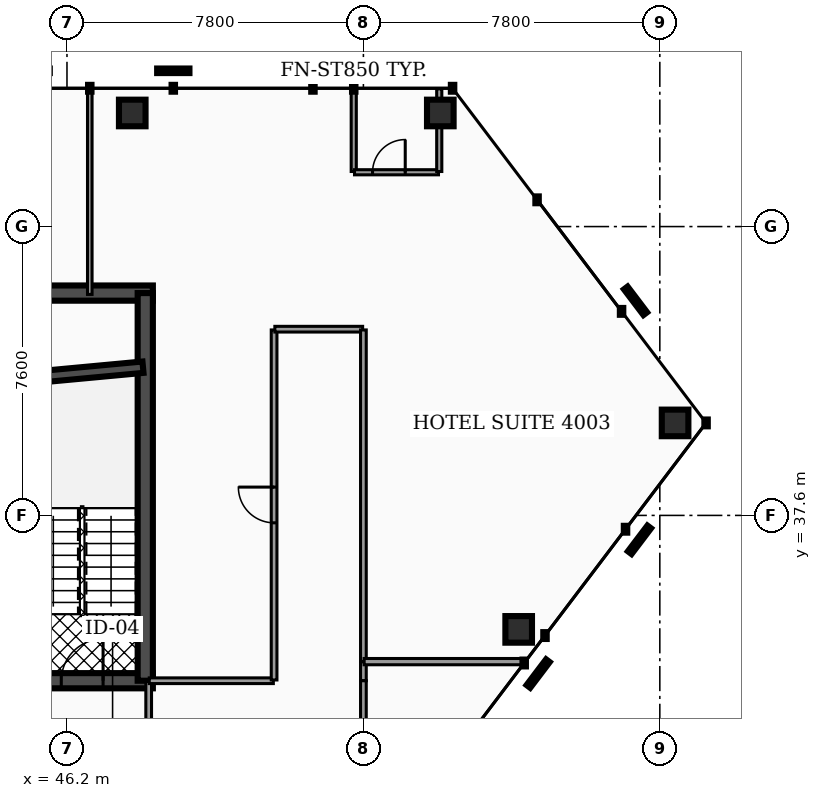
"""IFC4 building model, lengths in metres.
Left out: names, types, materials, properties, quantities, classifications, styles, units other than length and angle.
Written with IfcOpenShell. Run it as: python <this file> out.ifc"""

import sys

from ifc_helpers import new_model, si_unit, direction, frame, frame_2d, origin, origin_2d, place, context, subcontext, project, spatial, rectangle, hollow_rectangle, extrude, element, fill, save


model = new_model("IFC4")
c1 = context("Model", 3, precision=1e-05, world=origin(), true_north=direction((0.0, 1.0)))
c2 = subcontext(c1, "Body", "Model", "MODEL_VIEW")
j1 = project(units=[si_unit("LENGTHUNIT", "METRE"), si_unit("PLANEANGLEUNIT", "RADIAN")], contexts=[c1])
p1 = place(None, origin())
s1 = spatial("IfcSite", under=j1, at=p1, CompositionType="ELEMENT")
p2 = place(p1, origin())
s2 = spatial("IfcBuilding", under=s1, at=p2, CompositionType="ELEMENT")
p3 = place(p2, frame((0.0, 0.0, 164.56)))
s3 = spatial("IfcBuildingStorey", under=s2, at=p3, CompositionType="ELEMENT", Elevation=164.56)
p4 = place(p3, frame((28.4, 43.45, 0.0), z_axis=(0.0, 0.0, 1.0), x_axis=(1.0, 0.0, 0.0)))
e1 = element("IfcWall", 1, at=p4, inside=s3, PredefinedType="SHEAR", context=c2, shape_type="SweptSolid", body=[
    extrude(rectangle(XDim=20.06, YDim=0.4, at=frame_2d((10.03, 0.0))), origin(), (0.0, 0.0, 1.0), 3.5),
])
p5 = place(p3, frame((28.4, 33.25, 0.0), z_axis=(0.0, 0.0, 1.0), x_axis=(1.0, 0.0, 0.0)))
e2 = element("IfcWall", 2, at=p5, inside=s3, PredefinedType="SHEAR", context=c2, shape_type="SweptSolid", body=[
    extrude(rectangle(XDim=20.06, YDim=0.4, at=frame_2d((10.03, 0.0))), origin(), (0.0, 0.0, 1.0), 3.5),
])
p6 = place(p5, frame((4.03, 0.0, 0.0)))
e3 = element("IfcOpeningElement", 3, at=p6, cuts=e2, PredefinedType="OPENING", context=c2, shape_type="SweptSolid", body=[
    extrude(rectangle(XDim=1.1, YDim=2.15, at=frame_2d((0.55, 1.075))), frame((0.0, 0.21, 0.0), z_axis=(0.0, -1.0, 0.0), x_axis=(1.0, 0.0, 0.0)), (0.0, 0.0, 1.0), 0.42),
])
p7 = place(p5, frame((14.87, 0.0, 0.0)))
e4 = element("IfcOpeningElement", 4, at=p7, cuts=e2, PredefinedType="OPENING", context=c2, shape_type="SweptSolid", body=[
    extrude(rectangle(XDim=1.1, YDim=2.15, at=frame_2d((0.55, 1.075))), frame((0.0, 0.21, 0.0), z_axis=(0.0, -1.0, 0.0), x_axis=(1.0, 0.0, 0.0)), (0.0, 0.0, 1.0), 0.42),
])
p8 = place(p5, frame((5.95, 0.0, 0.0)))
e5 = element("IfcOpeningElement", 5, at=p8, cuts=e2, PredefinedType="OPENING", context=c2, shape_type="SweptSolid", body=[
    extrude(rectangle(XDim=1.0, YDim=2.1, at=frame_2d((0.5, 1.05))), frame((0.0, 0.21, 0.0), z_axis=(0.0, -1.0, 0.0), x_axis=(1.0, 0.0, 0.0)), (0.0, 0.0, 1.0), 0.42),
])
p9 = place(p5, frame((7.65, 0.0, 0.0)))
e6 = element("IfcOpeningElement", 6, at=p9, cuts=e2, PredefinedType="OPENING", context=c2, shape_type="SweptSolid", body=[
    extrude(rectangle(XDim=1.0, YDim=2.1, at=frame_2d((0.5, 1.05))), frame((0.0, 0.21, 0.0), z_axis=(0.0, -1.0, 0.0), x_axis=(1.0, 0.0, 0.0)), (0.0, 0.0, 1.0), 0.42),
])
p10 = place(p5, frame((1.31, 0.0, 0.0)))
e7 = element("IfcOpeningElement", 7, at=p10, cuts=e2, PredefinedType="OPENING", context=c2, shape_type="SweptSolid", body=[
    extrude(rectangle(XDim=1.1, YDim=2.2, at=frame_2d((0.55, 1.1))), frame((0.0, 0.21, 0.0), z_axis=(0.0, -1.0, 0.0), x_axis=(1.0, 0.0, 0.0)), (0.0, 0.0, 1.0), 0.42),
])
p11 = place(p5, frame((9.44, 0.0, 0.0)))
e8 = element("IfcOpeningElement", 8, at=p11, cuts=e2, PredefinedType="OPENING", context=c2, shape_type="SweptSolid", body=[
    extrude(rectangle(XDim=1.12, YDim=2.05, at=frame_2d((0.56, 1.025))), frame((0.0, 0.21, 0.0), z_axis=(0.0, -1.0, 0.0), x_axis=(1.0, 0.0, 0.0)), (0.0, 0.0, 1.0), 0.42),
])
p12 = place(p5, frame((17.65, 0.0, 0.0)))
e9 = element("IfcOpeningElement", 9, at=p12, cuts=e2, PredefinedType="OPENING", context=c2, shape_type="SweptSolid", body=[
    extrude(rectangle(XDim=1.1, YDim=2.2, at=frame_2d((0.55, 1.1))), frame((0.0, 0.21, 0.0), z_axis=(0.0, -1.0, 0.0), x_axis=(1.0, 0.0, 0.0)), (0.0, 0.0, 1.0), 0.42),
])
p13 = place(p3, frame((48.26, 33.25, 0.0), z_axis=(0.0, 0.0, 1.0), x_axis=(0.0, 1.0, 0.0)))
e10 = element("IfcWall", 10, at=p13, inside=s3, PredefinedType="SHEAR", context=c2, shape_type="SweptSolid", body=[
    extrude(rectangle(XDim=10.2, YDim=0.4, at=frame_2d((5.1, 0.0))), origin(), (0.0, 0.0, 1.0), 3.5),
])
p14 = place(p3, frame((44.98, 41.2, 0.0), z_axis=(0.0, 0.0, 1.0), x_axis=(0.995686468965, 0.09278176286, 0.0)))
e11 = element("IfcWall", 11, at=p14, inside=s3, PredefinedType="SHEAR", context=c2, shape_type="SweptSolid", body=[
    extrude(rectangle(XDim=3.234, YDim=0.3, at=frame_2d((1.617, 0.0))), origin(), (0.0, 0.0, 1.0), 3.5),
])
for number, where, z_axis, x_axis in (
    (12, (56.024, 48.189, 0.0), (0.0, 0.0, 1.0), (1.0, 0.0, 0.0)),
    (13, (47.917, 48.189, 0.0), (0.0, 0.0, 1.0), (1.0, 0.0, 0.0)),
    (14, (58.086, 34.601, 0.0), (0.0, 0.0, 1.0), (1.0, 0.0, 0.0)),
    (15, (62.202, 40.034, 0.0), (0.0, 0.0, 1.0), (1.0, 0.0, 0.0)),
):
    element("IfcColumn", number, at=place(p3, frame(where, z_axis=z_axis, x_axis=x_axis)), inside=s3, PredefinedType="COLUMN", context=c2, shape_type="SweptSolid", body=[
        extrude(hollow_rectangle(XDim=0.7, YDim=0.7, WallThickness=0.035, at=origin_2d()), origin(), (0.0, 0.0, 1.0), 3.5),
    ])
p15 = place(p3, frame((48.35, 30.17, 0.0), z_axis=(0.0, 0.0, 1.0), x_axis=(0.0, 1.0, 0.0)))
e16 = element("IfcWall", 16, at=p15, inside=s3, PredefinedType="PARTITIONING", context=c2, shape_type="SweptSolid", body=[
    extrude(rectangle(XDim=3.06, YDim=0.15, at=frame_2d((1.53, 0.0))), origin(), (0.0, 0.0, 1.0), 2.457),
])
p16 = place(p15, frame((1.06, 0.0, 0.0)))
e17 = element("IfcOpeningElement", 17, at=p16, cuts=e16, PredefinedType="OPENING", context=c2, shape_type="SweptSolid", body=[
    extrude(rectangle(XDim=0.94, YDim=2.05, at=frame_2d((0.47, 1.025))), frame((0.0, 0.085, 0.0), z_axis=(0.0, -1.0, 0.0), x_axis=(1.0, 0.0, 0.0)), (0.0, 0.0, 1.0), 0.17),
])
p17 = place(p3, frame((54.0, 33.25, 0.0), z_axis=(0.0, 0.0, 1.0), x_axis=(0.0, 1.0, 0.0)))
e18 = element("IfcWall", 18, at=p17, inside=s3, PredefinedType="PARTITIONING", context=c2, shape_type="SweptSolid", body=[
    extrude(rectangle(XDim=0.498, YDim=0.15, at=frame_2d((0.249, 0.0))), origin(), (0.0, 0.0, 1.0), 2.457),
])
p18 = place(p3, frame((54.0, 31.894, 0.0), z_axis=(0.0, 0.0, 1.0), x_axis=(0.0, 1.0, 0.0)))
e19 = element("IfcWall", 19, at=p18, inside=s3, PredefinedType="PARTITIONING", context=c2, shape_type="SweptSolid", body=[
    extrude(rectangle(XDim=1.356, YDim=0.15, at=frame_2d((0.678, 0.0))), origin(), (0.0, 0.0, 1.0), 2.457),
])
p19 = place(p3, frame((48.365, 33.25, 0.0), z_axis=(0.0, 0.0, 1.0), x_axis=(1.0, 0.0, 0.0)))
e20 = element("IfcWall", 20, at=p19, inside=s3, PredefinedType="PARTITIONING", context=c2, shape_type="SweptSolid", body=[
    extrude(rectangle(XDim=3.265, YDim=0.15, at=frame_2d((1.632, 0.0))), origin(), (0.0, 0.0, 1.0), 2.457),
])
p20 = place(p3, frame((51.65, 33.27, 0.0), z_axis=(0.0, 0.0, 1.0), x_axis=(0.0, 1.0, 0.0)))
e21 = element("IfcWall", 21, at=p20, inside=s3, PredefinedType="PARTITIONING", context=c2, shape_type="SweptSolid", body=[
    extrude(rectangle(XDim=9.21, YDim=0.15, at=frame_2d((4.605, 0.0))), origin(), (0.0, 0.0, 1.0), 2.457),
])
p21 = place(p20, frame((4.135, 0.0, 0.0)))
e22 = element("IfcOpeningElement", 22, at=p21, cuts=e21, PredefinedType="OPENING", context=c2, shape_type="SweptSolid", body=[
    extrude(rectangle(XDim=0.94, YDim=2.05, at=frame_2d((0.47, 1.025))), frame((0.0, 0.085, 0.0), z_axis=(0.0, -1.0, 0.0), x_axis=(1.0, 0.0, 0.0)), (0.0, 0.0, 1.0), 0.17),
])
p22 = place(p3, frame((51.67, 42.5, 0.0), z_axis=(0.0, 0.0, 1.0), x_axis=(1.0, 0.0, 0.0)))
e23 = element("IfcWall", 23, at=p22, inside=s3, PredefinedType="PARTITIONING", context=c2, shape_type="SweptSolid", body=[
    extrude(rectangle(XDim=2.31, YDim=0.15, at=frame_2d((1.155, 0.0))), origin(), (0.0, 0.0, 1.0), 2.457),
])
p23 = place(p3, frame((54.0, 33.758, 0.0), z_axis=(0.0, 0.0, 1.0), x_axis=(0.0, 1.0, 0.0)))
e24 = element("IfcWall", 24, at=p23, inside=s3, PredefinedType="PARTITIONING", context=c2, shape_type="SweptSolid", body=[
    extrude(rectangle(XDim=8.722, YDim=0.15, at=frame_2d((4.361, 0.0))), origin(), (0.0, 0.0, 1.0), 2.457),
])
p24 = place(p3, frame((46.8, 43.415, 0.0), z_axis=(0.0, 0.0, 1.0), x_axis=(0.0, 1.0, 0.0)))
e25 = element("IfcWall", 25, at=p24, inside=s3, PredefinedType="PARTITIONING", context=c2, shape_type="SweptSolid", body=[
    extrude(rectangle(XDim=5.409, YDim=0.12, at=frame_2d((2.705, 0.0))), origin(), (0.0, 0.0, 1.0), 2.457),
])
p25 = place(p3, frame((54.02, 33.753, 0.0), z_axis=(0.0, 0.0, 1.0), x_axis=(1.0, 0.0, 0.0)))
e26 = element("IfcWall", 26, at=p25, inside=s3, PredefinedType="PARTITIONING", context=c2, shape_type="SweptSolid", body=[
    extrude(rectangle(XDim=4.224, YDim=0.165, at=frame_2d((2.112, 0.0))), origin(), (0.0, 0.0, 1.0), 2.457),
])
p26 = place(p3, frame((53.746, 46.649, 0.0), z_axis=(0.0, 0.0, 1.0), x_axis=(0.0, 1.0, 0.0)))
e27 = element("IfcWall", 27, at=p26, inside=s3, PredefinedType="PARTITIONING", context=c2, shape_type="SweptSolid", body=[
    extrude(rectangle(XDim=2.175, YDim=0.135, at=frame_2d((1.087, 0.0))), origin(), (0.0, 0.0, 1.0), 2.457),
])
p27 = place(p3, frame((53.766, 46.629, 0.0), z_axis=(0.0, 0.0, 1.0), x_axis=(1.0, 0.0, 0.0)))
e28 = element("IfcWall", 28, at=p27, inside=s3, PredefinedType="PARTITIONING", context=c2, shape_type="SweptSolid", body=[
    extrude(rectangle(XDim=2.21, YDim=0.135, at=frame_2d((1.105, 0.0))), origin(), (0.0, 0.0, 1.0), 2.457),
])
p28 = place(p27, frame((0.475, 0.0, 0.0)))
e29 = element("IfcOpeningElement", 29, at=p28, cuts=e28, PredefinedType="OPENING", context=c2, shape_type="SweptSolid", body=[
    extrude(rectangle(XDim=0.86, YDim=2.05, at=frame_2d((0.43, 1.025))), frame((0.0, 0.077, 0.0), z_axis=(0.0, -1.0, 0.0), x_axis=(1.0, 0.0, 0.0)), (0.0, 0.0, 1.0), 0.155),
])
p29 = place(p3, frame((55.996, 46.649, 0.0), z_axis=(0.0, 0.0, 1.0), x_axis=(0.0, 1.0, 0.0)))
e30 = element("IfcWall", 30, at=p29, inside=s3, PredefinedType="PARTITIONING", context=c2, shape_type="SweptSolid", body=[
    extrude(rectangle(XDim=2.175, YDim=0.135, at=frame_2d((1.087, 0.0))), origin(), (0.0, 0.0, 1.0), 2.457),
])
p30 = place(p12, origin())
e31 = element("IfcDoor", 31, at=p30, inside=s3, OperationType="SINGLE_SWING_RIGHT", PredefinedType="DOOR", context=c2, shape_type="SweptSolid", body=[
    extrude(rectangle(XDim=1.1, YDim=2.2, at=frame_2d((0.55, 1.1))), frame((0.0, 0.025, 0.0), z_axis=(0.0, -1.0, 0.0), x_axis=(1.0, 0.0, 0.0)), (0.0, 0.0, 1.0), 0.05),
])
fill(e9, e31)
p31 = place(p21, origin())
e32 = element("IfcDoor", 32, at=p31, inside=s3, OperationType="SINGLE_SWING_RIGHT", PredefinedType="DOOR", context=c2, shape_type="SweptSolid", body=[
    extrude(rectangle(XDim=0.94, YDim=2.05, at=frame_2d((0.47, 1.025))), frame((0.0, 0.025, 0.0), z_axis=(0.0, -1.0, 0.0), x_axis=(1.0, 0.0, 0.0)), (0.0, 0.0, 1.0), 0.05),
])
fill(e22, e32)
p32 = place(p28, origin())
e33 = element("IfcDoor", 33, at=p32, inside=s3, OperationType="SINGLE_SWING_RIGHT", PredefinedType="DOOR", context=c2, shape_type="SweptSolid", body=[
    extrude(rectangle(XDim=0.86, YDim=2.05, at=frame_2d((0.43, 1.025))), frame((0.0, 0.025, 0.0), z_axis=(0.0, -1.0, 0.0), x_axis=(1.0, 0.0, 0.0)), (0.0, 0.0, 1.0), 0.05),
])
fill(e29, e33)
save(model, sys.argv[1])
